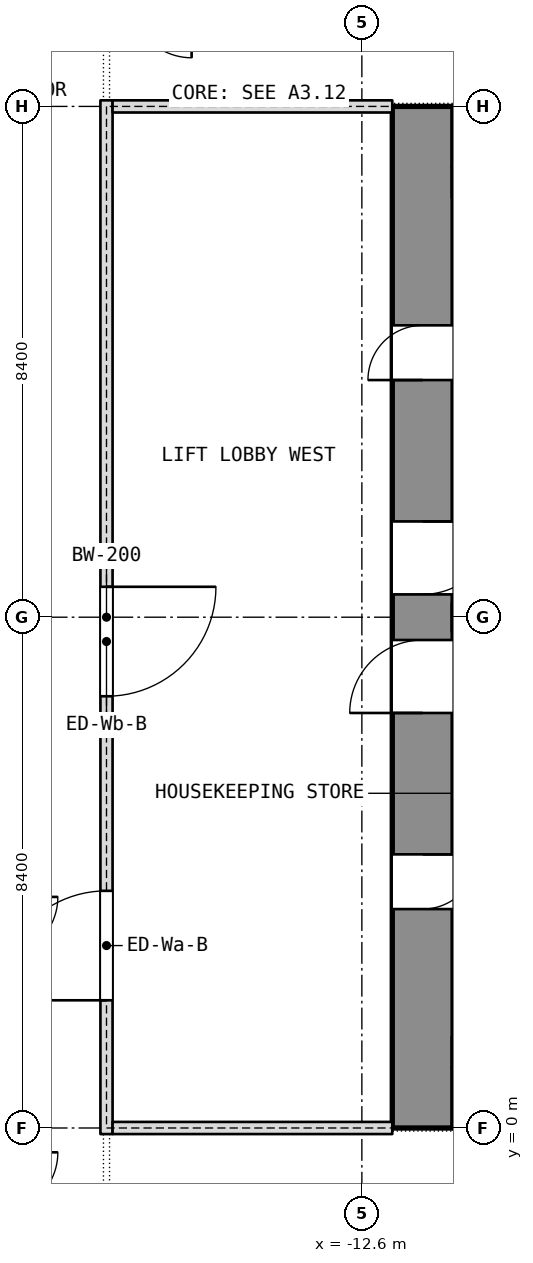
"""IFC4 building model, lengths in metres.
Left out: names, types, materials, properties, quantities, classifications, styles, units other than length and angle.
Written with IfcOpenShell. Run it as: python <this file> out.ifc"""

import sys

from ifc_helpers import new_model, si_unit, direction, frame, frame_2d, origin, place, context, subcontext, project, spatial, rectangle, extrude, element, fill, save


model = new_model("IFC4")
c1 = context("Model", 3, precision=1e-05, world=origin(), true_north=direction((0.0, 1.0)))
c2 = subcontext(c1, "Body", "Model", "MODEL_VIEW")
j1 = project(units=[si_unit("LENGTHUNIT", "METRE"), si_unit("PLANEANGLEUNIT", "RADIAN")], contexts=[c1])
p1 = place(None, origin())
s1 = spatial("IfcSite", under=j1, at=p1, CompositionType="ELEMENT")
p2 = place(p1, origin())
s2 = spatial("IfcBuilding", under=s1, at=p2, CompositionType="ELEMENT")
p3 = place(p2, frame((0.0, 0.0, 137.3)))
s3 = spatial("IfcBuildingStorey", under=s2, at=p3, CompositionType="ELEMENT", Elevation=137.3)
p4 = place(p3, frame((-11.6, 0.0, 0.0), z_axis=(0.0, 0.0, 1.0), x_axis=(0.0, 1.0, 0.0)))
e1 = element("IfcWall", 1, at=p4, inside=s3, PredefinedType="SHEAR", context=c2, shape_type="SweptSolid", body=[
    extrude(rectangle(XDim=16.8, YDim=1.0, at=frame_2d((8.4, 0.0))), origin(), (0.0, 0.0, 1.0), 3.6),
])
p5 = place(p4, frame((3.6, 0.0, 0.0)))
e2 = element("IfcOpeningElement", 2, at=p5, cuts=e1, PredefinedType="OPENING", context=c2, shape_type="SweptSolid", body=[
    extrude(rectangle(XDim=0.9, YDim=2.1, at=frame_2d((0.45, 1.05))), frame((0.0, 0.5, 0.0), z_axis=(0.0, -1.0, 0.0), x_axis=(1.0, 0.0, 0.0)), (0.0, 0.0, 1.0), 1.0),
])
p6 = place(p4, frame((6.825, 0.0, 0.0)))
e3 = element("IfcOpeningElement", 3, at=p6, cuts=e1, PredefinedType="OPENING", context=c2, shape_type="SweptSolid", body=[
    extrude(rectangle(XDim=1.2, YDim=2.1, at=frame_2d((0.6, 1.05))), frame((0.0, 0.5, 0.0), z_axis=(0.0, -1.0, 0.0), x_axis=(1.0, 0.0, 0.0)), (0.0, 0.0, 1.0), 1.0),
])
p7 = place(p4, frame((12.3, 0.0, 0.0)))
e4 = element("IfcOpeningElement", 4, at=p7, cuts=e1, PredefinedType="OPENING", context=c2, shape_type="SweptSolid", body=[
    extrude(rectangle(XDim=0.9, YDim=2.1, at=frame_2d((0.45, 1.05))), frame((0.0, 0.5, 0.0), z_axis=(0.0, -1.0, 0.0), x_axis=(1.0, 0.0, 0.0)), (0.0, 0.0, 1.0), 1.0),
])
p8 = place(p4, frame((8.775, 0.0, 0.0)))
e5 = element("IfcOpeningElement", 5, at=p8, cuts=e1, PredefinedType="OPENING", context=c2, shape_type="SweptSolid", body=[
    extrude(rectangle(XDim=1.2, YDim=2.1, at=frame_2d((0.6, 1.05))), frame((0.0, 0.5, 0.0), z_axis=(0.0, -1.0, 0.0), x_axis=(1.0, 0.0, 0.0)), (0.0, 0.0, 1.0), 1.0),
])
p9 = place(p3, frame((-11.1, 8.4, 0.0), z_axis=(0.0, 0.0, 1.0), x_axis=(1.0, 0.0, 0.0)))
e6 = element("IfcWall", 6, at=p9, inside=s3, PredefinedType="SHEAR", context=c2, shape_type="SweptSolid", body=[
    extrude(rectangle(XDim=6.675, YDim=0.45, at=frame_2d((3.337, 0.0))), origin(), (0.0, 0.0, 1.0), 3.6),
])
p10 = place(p3, frame((-16.8, -0.1, 0.0), z_axis=(0.0, 0.0, 1.0), x_axis=(0.0, 1.0, 0.0)))
e7 = element("IfcWall", 7, at=p10, inside=s3, PredefinedType="PARTITIONING", context=c2, shape_type="SweptSolid", body=[
    extrude(rectangle(XDim=17.0, YDim=0.2, at=frame_2d((8.5, 0.0))), origin(), (0.0, 0.0, 1.0), 3.34),
])
p11 = place(p10, frame((2.2, 0.0, 0.0)))
e8 = element("IfcOpeningElement", 8, at=p11, cuts=e7, PredefinedType="OPENING", context=c2, shape_type="SweptSolid", body=[
    extrude(rectangle(XDim=1.8, YDim=2.1, at=frame_2d((0.9, 1.05))), frame((0.0, 0.1, 0.0), z_axis=(0.0, -1.0, 0.0), x_axis=(1.0, 0.0, 0.0)), (0.0, 0.0, 1.0), 0.2),
])
p12 = place(p10, frame((7.2, 0.0, 0.0)))
e9 = element("IfcOpeningElement", 9, at=p12, cuts=e7, PredefinedType="OPENING", context=c2, shape_type="SweptSolid", body=[
    extrude(rectangle(XDim=1.8, YDim=2.1, at=frame_2d((0.9, 1.05))), frame((0.0, 0.1, 0.0), z_axis=(0.0, -1.0, 0.0), x_axis=(1.0, 0.0, 0.0)), (0.0, 0.0, 1.0), 0.2),
])
for number, where, z_axis, x_axis in (
    (10, (-16.7, 0.0, 0.0), (0.0, 0.0, 1.0), (1.0, 0.0, 0.0)),
    (11, (-16.7, 16.8, 0.0), (0.0, 0.0, 1.0), (1.0, 0.0, 0.0)),
):
    element("IfcWall", number, at=place(p3, frame(where, z_axis=z_axis, x_axis=x_axis)), inside=s3, PredefinedType="PARTITIONING", context=c2, shape_type="SweptSolid", body=[
        extrude(rectangle(XDim=4.6, YDim=0.2, at=frame_2d((2.3, 0.0))), origin(), (0.0, 0.0, 1.0), 2.89),
    ])
p13 = place(p5, origin())
e12 = element("IfcDoor", 12, at=p13, inside=s3, OperationType="SINGLE_SWING_LEFT", PredefinedType="DOOR", context=c2, shape_type="SweptSolid", body=[
    extrude(rectangle(XDim=0.9, YDim=2.1, at=frame_2d((0.45, 1.05))), frame((0.0, 0.025, 0.0), z_axis=(0.0, -1.0, 0.0), x_axis=(1.0, 0.0, 0.0)), (0.0, 0.0, 1.0), 0.05),
])
fill(e2, e12)
p14 = place(p6, origin())
e13 = element("IfcDoor", 13, at=p14, inside=s3, OperationType="SINGLE_SWING_LEFT", PredefinedType="DOOR", context=c2, shape_type="SweptSolid", body=[
    extrude(rectangle(XDim=1.2, YDim=2.1, at=frame_2d((0.6, 1.05))), frame((0.0, 0.025, 0.0), z_axis=(0.0, -1.0, 0.0), x_axis=(1.0, 0.0, 0.0)), (0.0, 0.0, 1.0), 0.05),
])
fill(e3, e13)
p15 = place(p7, origin())
e14 = element("IfcDoor", 14, at=p15, inside=s3, OperationType="SINGLE_SWING_LEFT", PredefinedType="DOOR", context=c2, shape_type="SweptSolid", body=[
    extrude(rectangle(XDim=0.9, YDim=2.1, at=frame_2d((0.45, 1.05))), frame((0.0, 0.025, 0.0), z_axis=(0.0, -1.0, 0.0), x_axis=(1.0, 0.0, 0.0)), (0.0, 0.0, 1.0), 0.05),
])
fill(e4, e14)
p16 = place(p8, origin())
e15 = element("IfcDoor", 15, at=p16, inside=s3, OperationType="SINGLE_SWING_LEFT", PredefinedType="DOOR", context=c2, shape_type="SweptSolid", body=[
    extrude(rectangle(XDim=1.2, YDim=2.1, at=frame_2d((0.6, 1.05))), frame((0.0, 0.025, 0.0), z_axis=(0.0, -1.0, 0.0), x_axis=(1.0, 0.0, 0.0)), (0.0, 0.0, 1.0), 0.05),
])
fill(e5, e15)
p17 = place(p11, origin())
e16 = element("IfcDoor", 16, at=p17, inside=s3, OperationType="DOUBLE_DOOR_SINGLE_SWING", PredefinedType="DOOR", context=c2, shape_type="SweptSolid", body=[
    extrude(rectangle(XDim=1.8, YDim=2.1, at=frame_2d((0.9, 1.05))), frame((0.0, 0.025, 0.0), z_axis=(0.0, -1.0, 0.0), x_axis=(1.0, 0.0, 0.0)), (0.0, 0.0, 1.0), 0.05),
])
fill(e8, e16)
p18 = place(p12, origin())
e17 = element("IfcDoor", 17, at=p18, inside=s3, OperationType="DOUBLE_DOOR_SINGLE_SWING", PredefinedType="DOOR", context=c2, shape_type="SweptSolid", body=[
    extrude(rectangle(XDim=1.8, YDim=2.1, at=frame_2d((0.9, 1.05))), frame((0.0, 0.025, 0.0), z_axis=(0.0, -1.0, 0.0), x_axis=(1.0, 0.0, 0.0)), (0.0, 0.0, 1.0), 0.05),
])
fill(e9, e17)
save(model, sys.argv[1])
